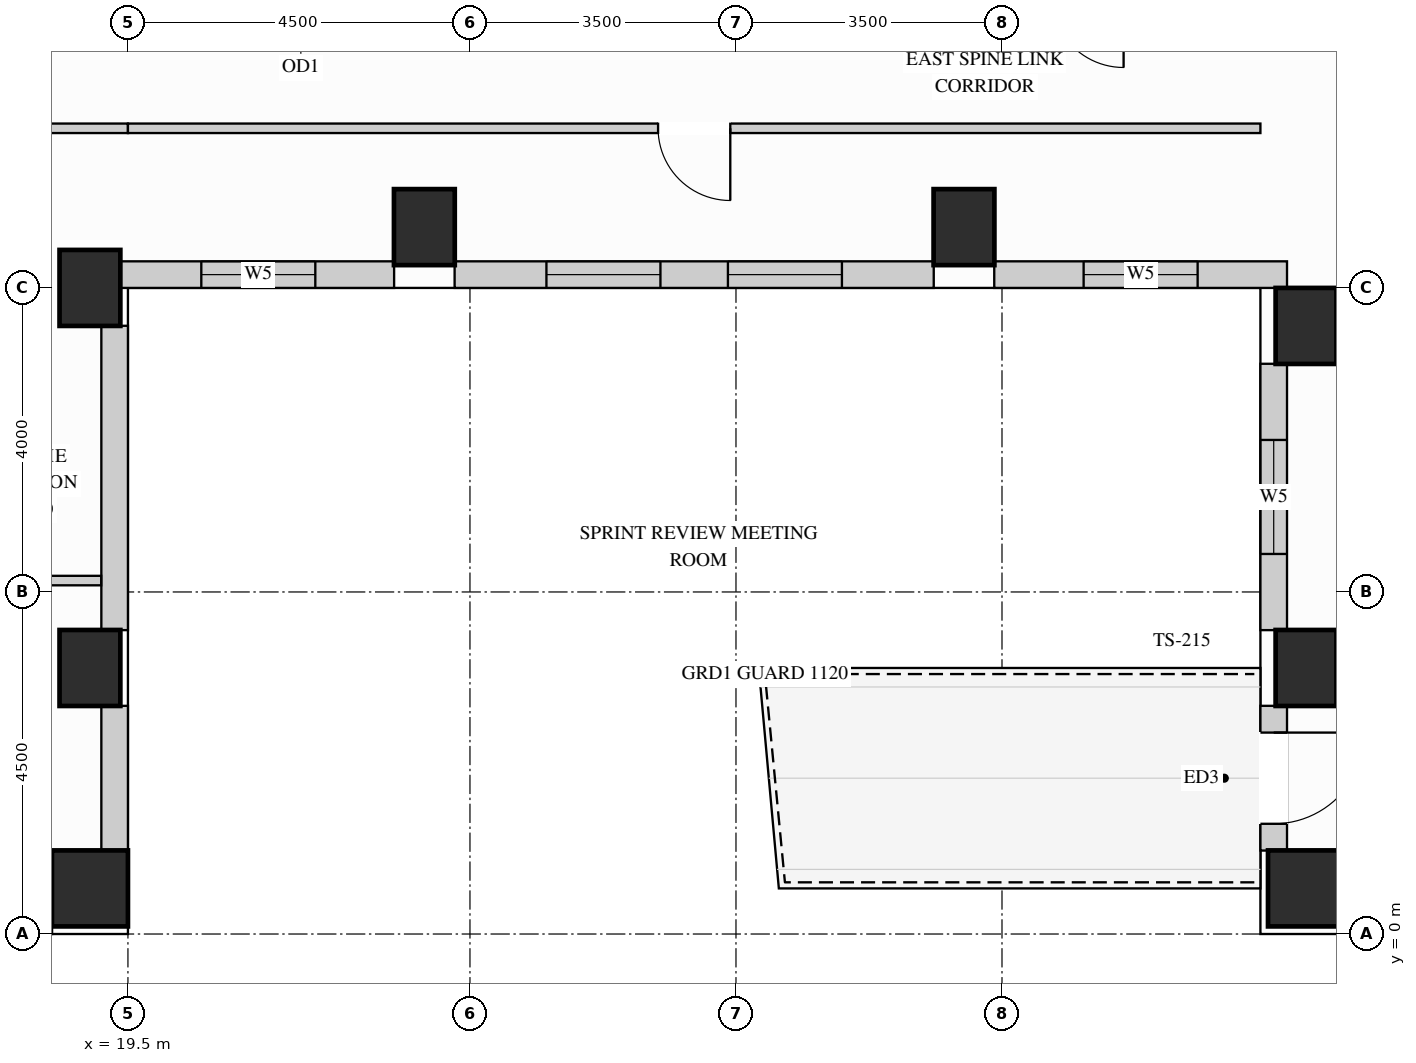
"""IFC4 building model, lengths in metres.
Left out: names, types, materials, properties, quantities, classifications, styles, units other than length and angle.
Written with IfcOpenShell. Run it as: python <this file> out.ifc"""

import sys

from ifc_helpers import new_model, si_unit, direction, frame, frame_2d, origin, origin_2d, place, context, subcontext, project, spatial, rectangle, extrude, source, transform, mapped, element, fill, save


model = new_model("IFC4")
c1 = context("Model", 3, precision=1e-05, world=origin(), true_north=direction((0.0, 1.0)))
c2 = subcontext(c1, "Body", "Model", "MODEL_VIEW")
j1 = project(units=[si_unit("LENGTHUNIT", "METRE"), si_unit("PLANEANGLEUNIT", "RADIAN")], contexts=[c1])
p1 = place(None, origin())
s1 = spatial("IfcSite", under=j1, at=p1, CompositionType="ELEMENT")
p2 = place(p1, origin())
s2 = spatial("IfcBuilding", under=s1, at=p2, CompositionType="ELEMENT")
p3 = place(p2, frame((0.0, 0.0, 193.5)))
s3 = spatial("IfcBuildingStorey", under=s2, at=p3, CompositionType="ELEMENT", Elevation=193.5)
m1 = source(origin(), c2, "Body", "SweptSolid", [
    extrude(rectangle(XDim=0.8, YDim=1.0, at=origin_2d()), origin(), (0.0, 0.0, 1.0), 3.4),
])
for number, where, z_axis, x_axis in (
    (1, (19.0, 3.5, 0.0), (0.0, 0.0, 1.0), (1.0, 0.0, 0.0)),
    (2, (19.0, 8.5, 0.0), (0.0, 0.0, 1.0), (1.0, 0.0, 0.0)),
    (3, (35.0, 3.5, 0.0), (0.0, 0.0, 1.0), (1.0, 0.0, 0.0)),
    (4, (35.0, 8.0, 0.0), (0.0, 0.0, 1.0), (1.0, 0.0, 0.0)),
    (5, (23.4, 9.3, 0.0), (0.0, 0.0, 1.0), (1.0, 0.0, 0.0)),
    (6, (30.5, 9.3, 0.0), (0.0, 0.0, 1.0), (1.0, 0.0, 0.0)),
):
    element("IfcColumn", number, at=place(p3, frame(where, z_axis=z_axis, x_axis=x_axis)), inside=s3, PredefinedType="COLUMN", context=c2, shape_type="MappedRepresentation", body=[
        mapped(m1, transform((0.0, 0.0, 0.0), x_axis=(1.0, 0.0, 0.0), y_axis=(0.0, 1.0, 0.0), z_axis=(0.0, 0.0, 1.0))),
    ])
m2 = source(origin(), c2, "Body", "SweptSolid", [
    extrude(rectangle(XDim=1.0, YDim=1.0, at=origin_2d()), origin(), (0.0, 0.0, 1.0), 3.4),
])
for number, where, z_axis, x_axis in (
    (7, (19.0, 0.6, 0.0), (0.0, 0.0, 1.0), (1.0, 0.0, 0.0)),
    (8, (35.0, 0.6, 0.0), (0.0, 0.0, 1.0), (1.0, 0.0, 0.0)),
):
    element("IfcColumn", number, at=place(p3, frame(where, z_axis=z_axis, x_axis=x_axis)), inside=s3, PredefinedType="COLUMN", context=c2, shape_type="MappedRepresentation", body=[
        mapped(m2, transform((0.0, 0.0, 0.0), x_axis=(1.0, 0.0, 0.0), y_axis=(0.0, 1.0, 0.0), z_axis=(0.0, 0.0, 1.0))),
    ])
p4 = place(p3, frame((14.998, 0.175, 0.0), z_axis=(0.0, 0.0, 1.0), x_axis=(1.0, 0.0, 0.0)))
e9 = element("IfcWall", 9, at=p4, inside=s3, PredefinedType="SOLIDWALL", context=c2, shape_type="SweptSolid", body=[
    extrude(rectangle(XDim=3.504, YDim=0.35, at=frame_2d((1.752, 0.0))), origin(), (0.0, 0.0, 1.0), 2.612),
])
p5 = place(p4, frame((0.552, 0.0, 0.78)))
e10 = element("IfcOpeningElement", 10, at=p5, cuts=e9, PredefinedType="OPENING", context=c2, shape_type="SweptSolid", body=[
    extrude(rectangle(XDim=2.4, YDim=1.652, at=frame_2d((1.2, 0.826))), frame((0.0, 0.185, 0.0), z_axis=(0.0, -1.0, 0.0), x_axis=(1.0, 0.0, 0.0)), (0.0, 0.0, 1.0), 0.37),
])
m3 = source(origin(), c2, "Body", "SweptSolid", [
    extrude(rectangle(XDim=1.904, YDim=0.35, at=frame_2d((0.952, 0.0))), origin(), (0.0, 0.0, 1.0), 2.612),
])
p6 = place(p3, frame((19.325, 1.098, 0.0), z_axis=(0.0, 0.0, 1.0), x_axis=(0.0, 1.0, 0.0)))
e11 = element("IfcWall", 11, at=p6, inside=s3, PredefinedType="SOLIDWALL", context=c2, shape_type="MappedRepresentation", body=[
    mapped(m3, transform((0.0, 0.0, 0.0), x_axis=(1.0, 0.0, 0.0), y_axis=(0.0, 1.0, 0.0), z_axis=(0.0, 0.0, 1.0))),
])
m4 = source(origin(), c2, "Body", "SweptSolid", [
    extrude(rectangle(XDim=4.004, YDim=0.35, at=frame_2d((2.002, 0.0))), origin(), (0.0, 0.0, 1.0), 2.612),
])
p7 = place(p3, frame((19.325, 3.998, 0.0), z_axis=(0.0, 0.0, 1.0), x_axis=(0.0, 1.0, 0.0)))
e12 = element("IfcWall", 12, at=p7, inside=s3, PredefinedType="SOLIDWALL", context=c2, shape_type="MappedRepresentation", body=[
    mapped(m4, transform((0.0, 0.0, 0.0), x_axis=(1.0, 0.0, 0.0), y_axis=(0.0, 1.0, 0.0), z_axis=(0.0, 0.0, 1.0))),
])
p8 = place(p3, frame((19.398, 8.675, 0.0), z_axis=(0.0, 0.0, 1.0), x_axis=(1.0, 0.0, 0.0)))
e13 = element("IfcWall", 13, at=p8, inside=s3, PredefinedType="SOLIDWALL", context=c2, shape_type="SweptSolid", body=[
    extrude(rectangle(XDim=3.604, YDim=0.35, at=frame_2d((1.802, 0.0))), origin(), (0.0, 0.0, 1.0), 3.385),
])
p9 = place(p8, frame((1.067, 0.0, 0.78)))
e14 = element("IfcOpeningElement", 14, at=p9, cuts=e13, PredefinedType="OPENING", context=c2, shape_type="SweptSolid", body=[
    extrude(rectangle(XDim=1.5, YDim=2.0, at=frame_2d((0.75, 1.0))), frame((0.0, 0.185, 0.0), z_axis=(0.0, -1.0, 0.0), x_axis=(1.0, 0.0, 0.0)), (0.0, 0.0, 1.0), 0.37),
])
p10 = place(p3, frame((23.798, 8.675, 0.0), z_axis=(0.0, 0.0, 1.0), x_axis=(1.0, 0.0, 0.0)))
e15 = element("IfcWall", 15, at=p10, inside=s3, PredefinedType="SOLIDWALL", context=c2, shape_type="SweptSolid", body=[
    extrude(rectangle(XDim=6.304, YDim=0.35, at=frame_2d((3.152, 0.0))), origin(), (0.0, 0.0, 1.0), 3.385),
])
p11 = place(p10, frame((1.208, 0.0, 0.78)))
e16 = element("IfcOpeningElement", 16, at=p11, cuts=e15, PredefinedType="OPENING", context=c2, shape_type="SweptSolid", body=[
    extrude(rectangle(XDim=1.5, YDim=2.0, at=frame_2d((0.75, 1.0))), frame((0.0, 0.185, 0.0), z_axis=(0.0, -1.0, 0.0), x_axis=(1.0, 0.0, 0.0)), (0.0, 0.0, 1.0), 0.37),
])
p12 = place(p10, frame((3.596, 0.0, 0.78)))
e17 = element("IfcOpeningElement", 17, at=p12, cuts=e15, PredefinedType="OPENING", context=c2, shape_type="SweptSolid", body=[
    extrude(rectangle(XDim=1.5, YDim=2.0, at=frame_2d((0.75, 1.0))), frame((0.0, 0.185, 0.0), z_axis=(0.0, -1.0, 0.0), x_axis=(1.0, 0.0, 0.0)), (0.0, 0.0, 1.0), 0.37),
])
p13 = place(p3, frame((30.898, 8.675, 0.0), z_axis=(0.0, 0.0, 1.0), x_axis=(1.0, 0.0, 0.0)))
e18 = element("IfcWall", 18, at=p13, inside=s3, PredefinedType="SOLIDWALL", context=c2, shape_type="SweptSolid", body=[
    extrude(rectangle(XDim=3.852, YDim=0.35, at=frame_2d((1.926, 0.0))), origin(), (0.0, 0.0, 1.0), 3.385),
])
p14 = place(p13, frame((1.176, 0.0, 0.78)))
e19 = element("IfcOpeningElement", 19, at=p14, cuts=e18, PredefinedType="OPENING", context=c2, shape_type="SweptSolid", body=[
    extrude(rectangle(XDim=1.5, YDim=2.0, at=frame_2d((0.75, 1.0))), frame((0.0, 0.185, 0.0), z_axis=(0.0, -1.0, 0.0), x_axis=(1.0, 0.0, 0.0)), (0.0, 0.0, 1.0), 0.37),
])
p15 = place(p3, frame((34.575, 7.502, 0.0), z_axis=(0.0, 0.0, 1.0), x_axis=(0.0, -1.0, 0.0)))
e20 = element("IfcWall", 20, at=p15, inside=s3, PredefinedType="SOLIDWALL", context=c2, shape_type="SweptSolid", body=[
    extrude(rectangle(XDim=3.504, YDim=0.35, at=frame_2d((1.752, 0.0))), origin(), (0.0, 0.0, 1.0), 2.612),
])
p16 = place(p15, frame((1.002, 0.0, 0.78)))
e21 = element("IfcOpeningElement", 21, at=p16, cuts=e20, PredefinedType="OPENING", context=c2, shape_type="SweptSolid", body=[
    extrude(rectangle(XDim=1.5, YDim=1.652, at=frame_2d((0.75, 0.826))), frame((0.0, 0.185, 0.0), z_axis=(0.0, -1.0, 0.0), x_axis=(1.0, 0.0, 0.0)), (0.0, 0.0, 1.0), 0.37),
])
p17 = place(p3, frame((34.575, 3.002, 0.0), z_axis=(0.0, 0.0, 1.0), x_axis=(0.0, -1.0, 0.0)))
e22 = element("IfcWall", 22, at=p17, inside=s3, PredefinedType="SOLIDWALL", context=c2, shape_type="SweptSolid", body=[
    extrude(rectangle(XDim=1.904, YDim=0.35, at=frame_2d((0.952, 0.0))), origin(), (0.0, 0.0, 1.0), 2.612),
])
p18 = place(p17, frame((0.352, 0.0, 0.0)))
e23 = element("IfcOpeningElement", 23, at=p18, cuts=e22, PredefinedType="OPENING", context=c2, shape_type="SweptSolid", body=[
    extrude(rectangle(XDim=1.2, YDim=2.15, at=frame_2d((0.6, 1.075))), frame((0.0, 0.185, 0.0), z_axis=(0.0, -1.0, 0.0), x_axis=(1.0, 0.0, 0.0)), (0.0, 0.0, 1.0), 0.37),
])
m5 = source(origin(), c2, "Body", "SweptSolid", [
    extrude(rectangle(XDim=2.45, YDim=0.125, at=frame_2d((1.225, 0.0))), origin(), (0.0, 0.0, 1.0), 3.385),
])
p19 = place(p3, frame((17.05, 10.6, 0.0), z_axis=(0.0, 0.0, 1.0), x_axis=(1.0, 0.0, 0.0)))
e24 = element("IfcWall", 24, at=p19, inside=s3, PredefinedType="PARTITIONING", context=c2, shape_type="MappedRepresentation", body=[
    mapped(m5, transform((0.0, 0.0, 0.0), x_axis=(1.0, 0.0, 0.0), y_axis=(0.0, 1.0, 0.0), z_axis=(0.0, 0.0, 1.0))),
])
p20 = place(p3, frame((19.5, 10.6, 0.0), z_axis=(0.0, 0.0, 1.0), x_axis=(1.0, 0.0, 0.0)))
e25 = element("IfcWall", 25, at=p20, inside=s3, PredefinedType="PARTITIONING", context=c2, shape_type="SweptSolid", body=[
    extrude(rectangle(XDim=14.9, YDim=0.125, at=frame_2d((7.45, 0.0))), origin(), (0.0, 0.0, 1.0), 3.385),
])
p21 = place(p20, frame((6.975, 0.0, 0.0)))
e26 = element("IfcOpeningElement", 26, at=p21, cuts=e25, PredefinedType="OPENING", context=c2, shape_type="SweptSolid", body=[
    extrude(rectangle(XDim=0.95, YDim=2.15, at=frame_2d((0.475, 1.075))), frame((0.0, 0.073, 0.0), z_axis=(0.0, -1.0, 0.0), x_axis=(1.0, 0.0, 0.0)), (0.0, 0.0, 1.0), 0.145),
])
m6 = source(origin(), c2, "Body", "SweptSolid", [
    extrude(rectangle(XDim=2.098, YDim=0.125, at=frame_2d((1.049, 0.0))), origin(), (0.0, 0.0, 1.0), 2.848),
])
p22 = place(p3, frame((17.05, 4.65, 0.0), z_axis=(0.0, 0.0, 1.0), x_axis=(1.0, 0.0, 0.0)))
e27 = element("IfcWall", 27, at=p22, inside=s3, PredefinedType="PARTITIONING", context=c2, shape_type="MappedRepresentation", body=[
    mapped(m6, transform((0.0, 0.0, 0.0), x_axis=(1.0, 0.0, 0.0), y_axis=(0.0, 1.0, 0.0), z_axis=(0.0, 0.0, 1.0))),
])
m7 = source(origin(), c2, "Body", "SweptSolid", [
    extrude(rectangle(XDim=1.2, YDim=2.15, at=frame_2d((0.6, 1.075))), frame((0.0, 0.025, 0.0), z_axis=(0.0, -1.0, 0.0), x_axis=(1.0, 0.0, 0.0)), (0.0, 0.0, 1.0), 0.05),
])
p23 = place(p18, frame((1.2, 0.0, 0.0), z_axis=(0.0, 0.0, 1.0), x_axis=(-1.0, 0.0, 0.0)))
e28 = element("IfcDoor", 28, at=p23, inside=s3, OperationType="SINGLE_SWING_LEFT", PredefinedType="DOOR", context=c2, shape_type="MappedRepresentation", body=[
    mapped(m7, transform((0.0, 0.0, 0.0), x_axis=(1.0, 0.0, 0.0), y_axis=(0.0, 1.0, 0.0), z_axis=(0.0, 0.0, 1.0))),
])
fill(e23, e28)
m8 = source(origin(), c2, "Body", "SweptSolid", [
    extrude(rectangle(XDim=0.95, YDim=2.15, at=frame_2d((0.475, 1.075))), frame((0.0, 0.025, 0.0), z_axis=(0.0, -1.0, 0.0), x_axis=(1.0, 0.0, 0.0)), (0.0, 0.0, 1.0), 0.05),
])
p24 = place(p21, origin())
e29 = element("IfcDoor", 29, at=p24, inside=s3, OperationType="SINGLE_SWING_RIGHT", PredefinedType="DOOR", context=c2, shape_type="MappedRepresentation", body=[
    mapped(m8, transform((0.0, 0.0, 0.0), x_axis=(1.0, 0.0, 0.0), y_axis=(0.0, 1.0, 0.0), z_axis=(0.0, 0.0, 1.0))),
])
fill(e26, e29)
m9 = source(origin(), c2, "Body", "SweptSolid", [
    extrude(rectangle(XDim=1.5, YDim=2.0, at=frame_2d((0.75, 1.0))), frame((0.0, 0.03, 0.0), z_axis=(0.0, -1.0, 0.0), x_axis=(1.0, 0.0, 0.0)), (0.0, 0.0, 1.0), 0.06),
])
p25 = place(p9, origin())
e30 = element("IfcWindow", 30, at=p25, inside=s3, PartitioningType="SINGLE_PANEL", PredefinedType="WINDOW", context=c2, shape_type="MappedRepresentation", body=[
    mapped(m9, transform((0.0, 0.0, 0.0), x_axis=(1.0, 0.0, 0.0), y_axis=(0.0, 1.0, 0.0), z_axis=(0.0, 0.0, 1.0))),
])
fill(e14, e30)
p26 = place(p11, origin())
e31 = element("IfcWindow", 31, at=p26, inside=s3, PartitioningType="SINGLE_PANEL", PredefinedType="WINDOW", context=c2, shape_type="MappedRepresentation", body=[
    mapped(m9, transform((0.0, 0.0, 0.0), x_axis=(1.0, 0.0, 0.0), y_axis=(0.0, 1.0, 0.0), z_axis=(0.0, 0.0, 1.0))),
])
fill(e16, e31)
p27 = place(p12, origin())
e32 = element("IfcWindow", 32, at=p27, inside=s3, PartitioningType="SINGLE_PANEL", PredefinedType="WINDOW", context=c2, shape_type="MappedRepresentation", body=[
    mapped(m9, transform((0.0, 0.0, 0.0), x_axis=(1.0, 0.0, 0.0), y_axis=(0.0, 1.0, 0.0), z_axis=(0.0, 0.0, 1.0))),
])
fill(e17, e32)
p28 = place(p14, origin())
e33 = element("IfcWindow", 33, at=p28, inside=s3, PartitioningType="SINGLE_PANEL", PredefinedType="WINDOW", context=c2, shape_type="MappedRepresentation", body=[
    mapped(m9, transform((0.0, 0.0, 0.0), x_axis=(1.0, 0.0, 0.0), y_axis=(0.0, 1.0, 0.0), z_axis=(0.0, 0.0, 1.0))),
])
fill(e19, e33)
m10 = source(origin(), c2, "Body", "SweptSolid", [
    extrude(rectangle(XDim=1.5, YDim=1.652, at=frame_2d((0.75, 0.826))), frame((0.0, 0.03, 0.0), z_axis=(0.0, -1.0, 0.0), x_axis=(1.0, 0.0, 0.0)), (0.0, 0.0, 1.0), 0.06),
])
p29 = place(p16, origin())
e34 = element("IfcWindow", 34, at=p29, inside=s3, PartitioningType="SINGLE_PANEL", PredefinedType="WINDOW", context=c2, shape_type="MappedRepresentation", body=[
    mapped(m10, transform((0.0, 0.0, 0.0), x_axis=(1.0, 0.0, 0.0), y_axis=(0.0, 1.0, 0.0), z_axis=(0.0, 0.0, 1.0))),
])
fill(e21, e34)
save(model, sys.argv[1])
